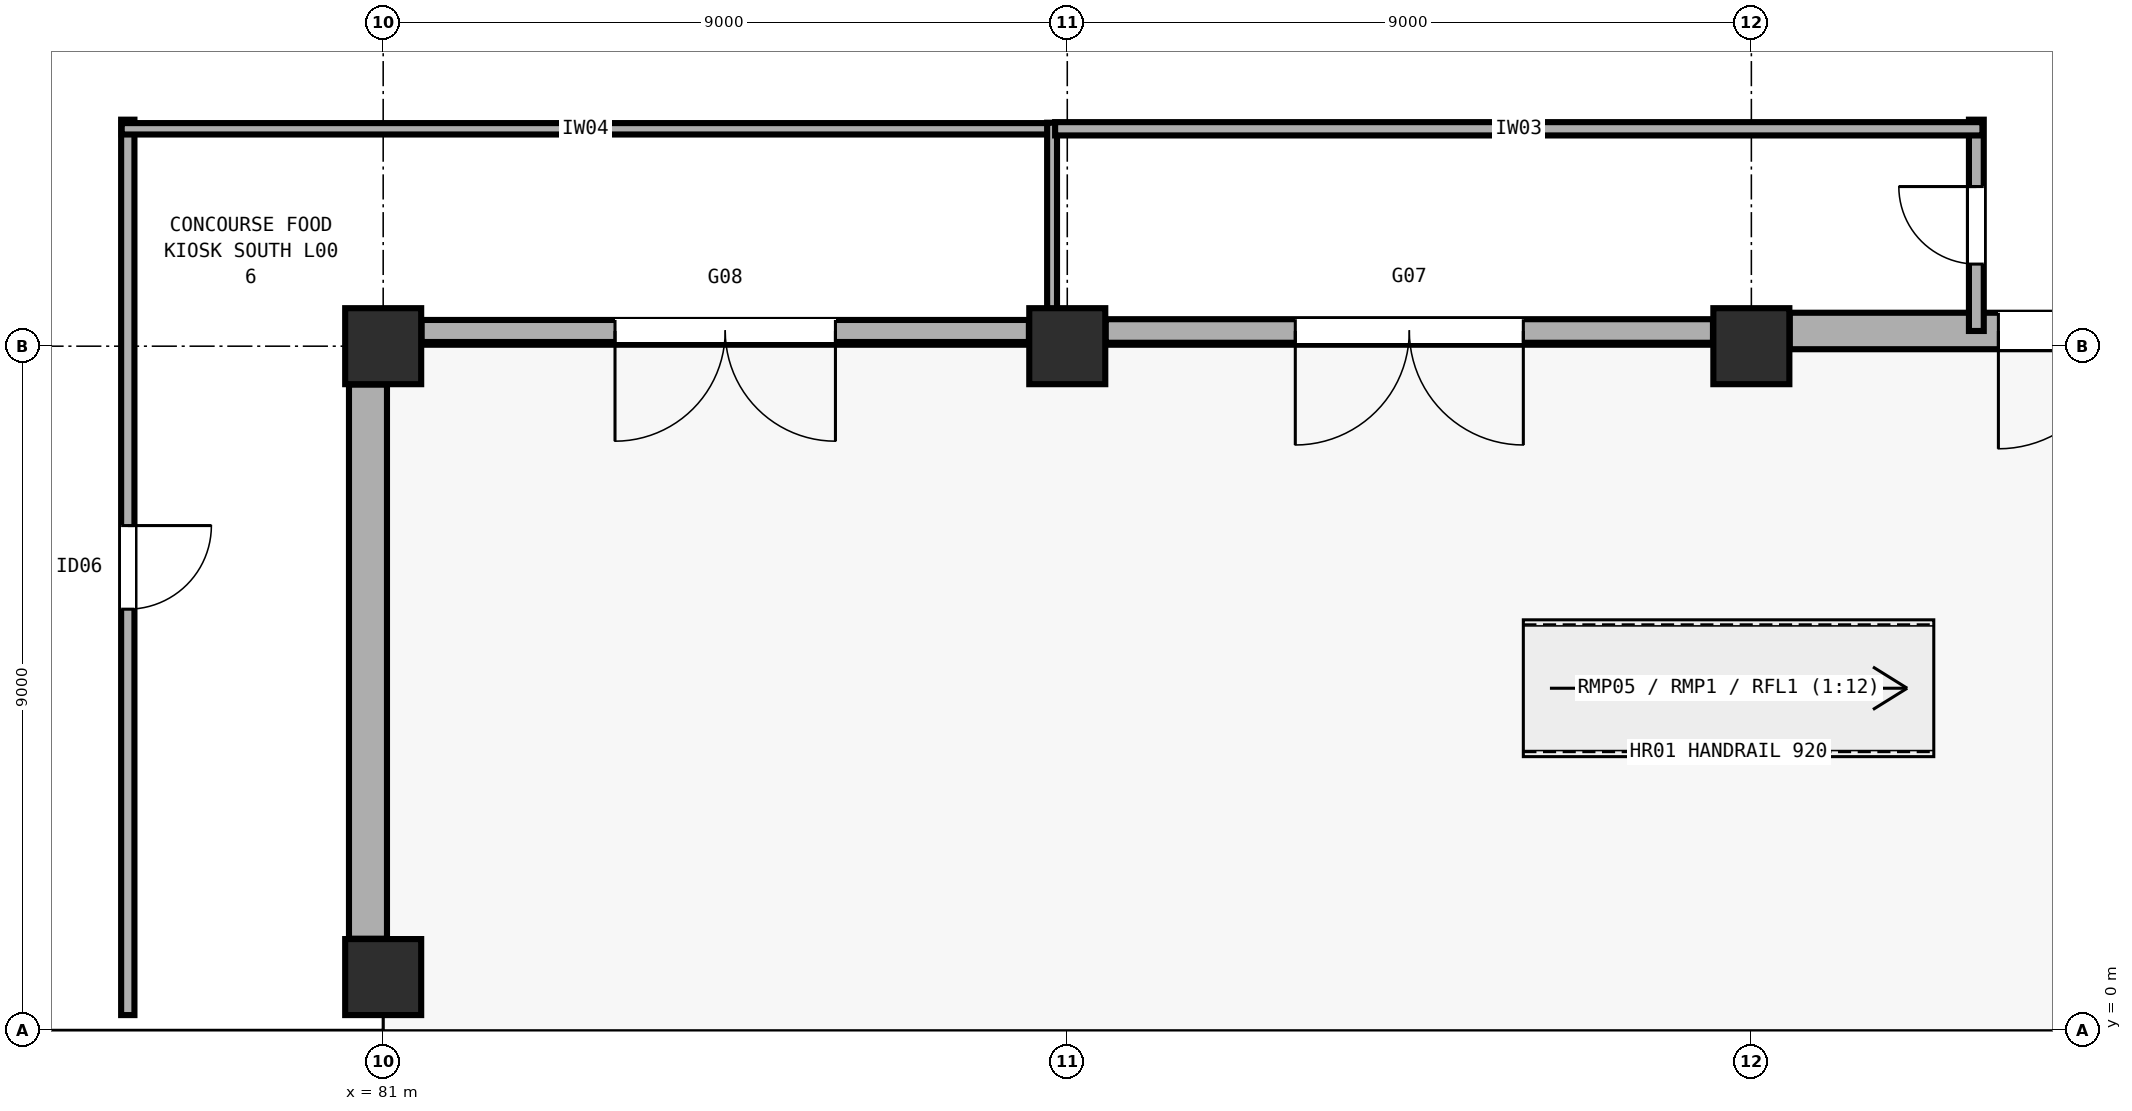
"""IFC4 building model, lengths in metres.
Left out: names, types, materials, properties, quantities, classifications, styles, units other than length and angle.
Written with IfcOpenShell. Run it as: python <this file> out.ifc"""

import sys

from ifc_helpers import new_model, si_unit, direction, frame, frame_2d, origin, origin_2d, place, context, subcontext, project, spatial, rectangle, extrude, element, fill, save


model = new_model("IFC4")
c1 = context("Model", 3, precision=1e-05, world=origin(), true_north=direction((0.0, 1.0)))
c2 = subcontext(c1, "Body", "Model", "MODEL_VIEW")
j1 = project(units=[si_unit("LENGTHUNIT", "METRE"), si_unit("PLANEANGLEUNIT", "RADIAN")], contexts=[c1])
p1 = place(None, origin())
s1 = spatial("IfcSite", under=j1, at=p1, CompositionType="ELEMENT")
p2 = place(p1, origin())
s2 = spatial("IfcBuilding", under=s1, at=p2, CompositionType="ELEMENT")
p3 = place(p2, origin())
s3 = spatial("IfcBuildingStorey", under=s2, at=p3, CompositionType="ELEMENT", Elevation=0.0)
for number, where, z_axis, x_axis in (
    (1, (81.0, 0.7, 0.0), (0.0, 0.0, 1.0), (1.0, 0.0, 0.0)),
    (2, (81.0, 9.0, 0.0), (0.0, 0.0, 1.0), (1.0, 0.0, 0.0)),
    (3, (90.0, 9.0, 0.0), (0.0, 0.0, 1.0), (1.0, 0.0, 0.0)),
    (4, (99.0, 9.0, 0.0), (0.0, 0.0, 1.0), (1.0, 0.0, 0.0)),
):
    element("IfcColumn", number, at=place(p3, frame(where, z_axis=z_axis, x_axis=x_axis)), inside=s3, PredefinedType="COLUMN", context=c2, shape_type="SweptSolid", body=[
        extrude(rectangle(XDim=1.0, YDim=1.0, at=origin_2d()), origin(), (0.0, 0.0, 1.0), 4.8),
    ])
p4 = place(p3, frame((107.495, 9.2, 0.0), z_axis=(0.0, 0.0, 1.0), x_axis=(-1.0, 0.0, 0.0)))
e5 = element("IfcWall", 5, at=p4, inside=s3, PredefinedType="SOLIDWALL", context=c2, shape_type="SweptSolid", body=[
    extrude(rectangle(XDim=7.99, YDim=0.48, at=frame_2d((3.995, 0.0))), origin(), (0.0, 0.0, 1.0), 3.58),
])
p5 = place(p4, frame((2.145, 0.0, 0.0)))
e6 = element("IfcOpeningElement", 6, at=p5, cuts=e5, PredefinedType="OPENING", context=c2, shape_type="SweptSolid", body=[
    extrude(rectangle(XDim=3.1, YDim=2.5, at=frame_2d((1.55, 1.25))), frame((0.0, 0.25, 0.0), z_axis=(0.0, -1.0, 0.0), x_axis=(1.0, 0.0, 0.0)), (0.0, 0.0, 1.0), 0.5),
])
p6 = place(p3, frame((98.495, 9.2, 0.0), z_axis=(0.0, 0.0, 1.0), x_axis=(-1.0, 0.0, 0.0)))
e7 = element("IfcWall", 7, at=p6, inside=s3, PredefinedType="SOLIDWALL", context=c2, shape_type="SweptSolid", body=[
    extrude(rectangle(XDim=7.99, YDim=0.31, at=frame_2d((3.995, 0.0))), origin(), (0.0, 0.0, 1.0), 3.58),
])
p7 = place(p6, frame((2.495, 0.0, 0.0)))
e8 = element("IfcOpeningElement", 8, at=p7, cuts=e7, PredefinedType="OPENING", context=c2, shape_type="SweptSolid", body=[
    extrude(rectangle(XDim=3.0, YDim=2.45, at=frame_2d((1.5, 1.225))), frame((0.0, 0.165, 0.0), z_axis=(0.0, -1.0, 0.0), x_axis=(1.0, 0.0, 0.0)), (0.0, 0.0, 1.0), 0.33),
])
p8 = place(p3, frame((89.495, 9.2, 0.0), z_axis=(0.0, 0.0, 1.0), x_axis=(-1.0, 0.0, 0.0)))
e9 = element("IfcWall", 9, at=p8, inside=s3, PredefinedType="SOLIDWALL", context=c2, shape_type="SweptSolid", body=[
    extrude(rectangle(XDim=7.99, YDim=0.29, at=frame_2d((3.995, 0.0))), origin(), (0.0, 0.0, 1.0), 3.58),
])
p9 = place(p8, frame((2.545, 0.0, 0.0)))
e10 = element("IfcOpeningElement", 10, at=p9, cuts=e9, PredefinedType="OPENING", context=c2, shape_type="SweptSolid", body=[
    extrude(rectangle(XDim=2.9, YDim=2.45, at=frame_2d((1.45, 1.225))), frame((0.0, 0.155, 0.0), z_axis=(0.0, -1.0, 0.0), x_axis=(1.0, 0.0, 0.0)), (0.0, 0.0, 1.0), 0.31),
])
p10 = place(p3, frame((80.8, 8.495, 0.0), z_axis=(0.0, 0.0, 1.0), x_axis=(0.0, -1.0, 0.0)))
e11 = element("IfcWall", 11, at=p10, inside=s3, PredefinedType="SOLIDWALL", context=c2, shape_type="SweptSolid", body=[
    extrude(rectangle(XDim=7.29, YDim=0.5, at=frame_2d((3.645, 0.0))), origin(), (0.0, 0.0, 1.0), 3.58),
])
p11 = place(p3, frame((80.495, 0.2, 0.0), z_axis=(0.0, 0.0, 1.0), x_axis=(-1.0, 0.0, 0.0)))
e12 = element("IfcWall", 12, at=p11, inside=s3, PredefinedType="SOLIDWALL", context=c2, shape_type="SweptSolid", body=[
    extrude(rectangle(XDim=7.99, YDim=0.48, at=frame_2d((3.995, 0.0))), origin(), (0.0, 0.0, 1.0), 3.58),
])
p12 = place(p11, frame((3.605, 0.0, 0.0)))
e13 = element("IfcOpeningElement", 13, at=p12, cuts=e12, PredefinedType="OPENING", context=c2, shape_type="SweptSolid", body=[
    extrude(rectangle(XDim=3.5, YDim=2.6, at=frame_2d((1.75, 1.3))), frame((0.0, 0.25, 0.0), z_axis=(0.0, -1.0, 0.0), x_axis=(1.0, 0.0, 0.0)), (0.0, 0.0, 1.0), 0.5),
])
p13 = place(p3, frame((77.64, 11.98, 0.0), z_axis=(0.0, 0.0, 1.0), x_axis=(0.0, -1.0, 0.0)))
e14 = element("IfcWall", 14, at=p13, inside=s3, PredefinedType="PARTITIONING", context=c2, shape_type="SweptSolid", body=[
    extrude(rectangle(XDim=11.78, YDim=0.175, at=frame_2d((5.89, 0.0))), origin(), (0.0, 0.0, 1.0), 3.28),
])
p14 = place(p13, frame((5.34, 0.0, 0.0)))
e15 = element("IfcOpeningElement", 15, at=p14, cuts=e14, PredefinedType="OPENING", context=c2, shape_type="SweptSolid", body=[
    extrude(rectangle(XDim=1.1, YDim=2.1, at=frame_2d((0.55, 1.05))), frame((0.0, 0.097, 0.0), z_axis=(0.0, -1.0, 0.0), x_axis=(1.0, 0.0, 0.0)), (0.0, 0.0, 1.0), 0.195),
])
p15 = place(p3, frame((77.56, 11.86, 0.0), z_axis=(0.0, 0.0, 1.0), x_axis=(1.0, 0.0, 0.0)))
e16 = element("IfcWall", 16, at=p15, inside=s3, PredefinedType="PARTITIONING", context=c2, shape_type="SweptSolid", body=[
    extrude(rectangle(XDim=12.2, YDim=0.15, at=frame_2d((6.1, 0.0))), origin(), (0.0, 0.0, 1.0), 3.28),
])
p16 = place(p3, frame((89.8, 11.94, 0.0), z_axis=(0.0, 0.0, 1.0), x_axis=(0.0, -1.0, 0.0)))
e17 = element("IfcWall", 17, at=p16, inside=s3, PredefinedType="PARTITIONING", context=c2, shape_type="SweptSolid", body=[
    extrude(rectangle(XDim=2.7, YDim=0.13, at=frame_2d((1.35, 0.0))), origin(), (0.0, 0.0, 1.0), 3.28),
])
p17 = place(p3, frame((101.96, 9.2, 0.0), z_axis=(0.0, 0.0, 1.0), x_axis=(0.0, 1.0, 0.0)))
e18 = element("IfcWall", 18, at=p17, inside=s3, PredefinedType="PARTITIONING", context=c2, shape_type="SweptSolid", body=[
    extrude(rectangle(XDim=2.78, YDim=0.195, at=frame_2d((1.39, 0.0))), origin(), (0.0, 0.0, 1.0), 3.28),
])
p18 = place(p17, frame((0.88, 0.0, 0.0)))
e19 = element("IfcOpeningElement", 19, at=p18, cuts=e18, PredefinedType="OPENING", context=c2, shape_type="SweptSolid", body=[
    extrude(rectangle(XDim=1.02, YDim=2.16, at=frame_2d((0.51, 1.08))), frame((0.0, 0.107, 0.0), z_axis=(0.0, -1.0, 0.0), x_axis=(1.0, 0.0, 0.0)), (0.0, 0.0, 1.0), 0.215),
])
p19 = place(p3, frame((89.84, 11.86, 0.0), z_axis=(0.0, 0.0, 1.0), x_axis=(1.0, 0.0, 0.0)))
e20 = element("IfcWall", 20, at=p19, inside=s3, PredefinedType="PARTITIONING", context=c2, shape_type="SweptSolid", body=[
    extrude(rectangle(XDim=12.2, YDim=0.175, at=frame_2d((6.1, 0.0))), origin(), (0.0, 0.0, 1.0), 3.28),
])
p20 = place(p12, origin())
e21 = element("IfcDoor", 21, at=p20, inside=s3, OperationType="DOUBLE_DOOR_SINGLE_SWING", PredefinedType="DOOR", context=c2, shape_type="SweptSolid", body=[
    extrude(rectangle(XDim=3.5, YDim=2.6, at=frame_2d((1.75, 1.3))), frame((0.0, 0.025, 0.0), z_axis=(0.0, -1.0, 0.0), x_axis=(1.0, 0.0, 0.0)), (0.0, 0.0, 1.0), 0.05),
])
fill(e13, e21)
p21 = place(p5, origin())
e22 = element("IfcDoor", 22, at=p21, inside=s3, OperationType="DOUBLE_DOOR_SINGLE_SWING", PredefinedType="DOOR", context=c2, shape_type="SweptSolid", body=[
    extrude(rectangle(XDim=3.1, YDim=2.5, at=frame_2d((1.55, 1.25))), frame((0.0, 0.025, 0.0), z_axis=(0.0, -1.0, 0.0), x_axis=(1.0, 0.0, 0.0)), (0.0, 0.0, 1.0), 0.05),
])
fill(e6, e22)
p22 = place(p7, origin())
e23 = element("IfcDoor", 23, at=p22, inside=s3, OperationType="DOUBLE_DOOR_SINGLE_SWING", PredefinedType="DOOR", context=c2, shape_type="SweptSolid", body=[
    extrude(rectangle(XDim=3.0, YDim=2.45, at=frame_2d((1.5, 1.225))), frame((0.0, 0.025, 0.0), z_axis=(0.0, -1.0, 0.0), x_axis=(1.0, 0.0, 0.0)), (0.0, 0.0, 1.0), 0.05),
])
fill(e8, e23)
p23 = place(p9, origin())
e24 = element("IfcDoor", 24, at=p23, inside=s3, OperationType="DOUBLE_DOOR_SINGLE_SWING", PredefinedType="DOOR", context=c2, shape_type="SweptSolid", body=[
    extrude(rectangle(XDim=2.9, YDim=2.45, at=frame_2d((1.45, 1.225))), frame((0.0, 0.025, 0.0), z_axis=(0.0, -1.0, 0.0), x_axis=(1.0, 0.0, 0.0)), (0.0, 0.0, 1.0), 0.05),
])
fill(e10, e24)
p24 = place(p14, origin())
e25 = element("IfcDoor", 25, at=p24, inside=s3, OperationType="SINGLE_SWING_LEFT", PredefinedType="DOOR", context=c2, shape_type="SweptSolid", body=[
    extrude(rectangle(XDim=1.1, YDim=2.1, at=frame_2d((0.55, 1.05))), frame((0.0, 0.025, 0.0), z_axis=(0.0, -1.0, 0.0), x_axis=(1.0, 0.0, 0.0)), (0.0, 0.0, 1.0), 0.05),
])
fill(e15, e25)
p25 = place(p18, origin())
e26 = element("IfcDoor", 26, at=p25, inside=s3, OperationType="SINGLE_SWING_RIGHT", PredefinedType="DOOR", context=c2, shape_type="SweptSolid", body=[
    extrude(rectangle(XDim=1.02, YDim=2.16, at=frame_2d((0.51, 1.08))), frame((0.0, 0.025, 0.0), z_axis=(0.0, -1.0, 0.0), x_axis=(1.0, 0.0, 0.0)), (0.0, 0.0, 1.0), 0.05),
])
fill(e19, e26)
save(model, sys.argv[1])
